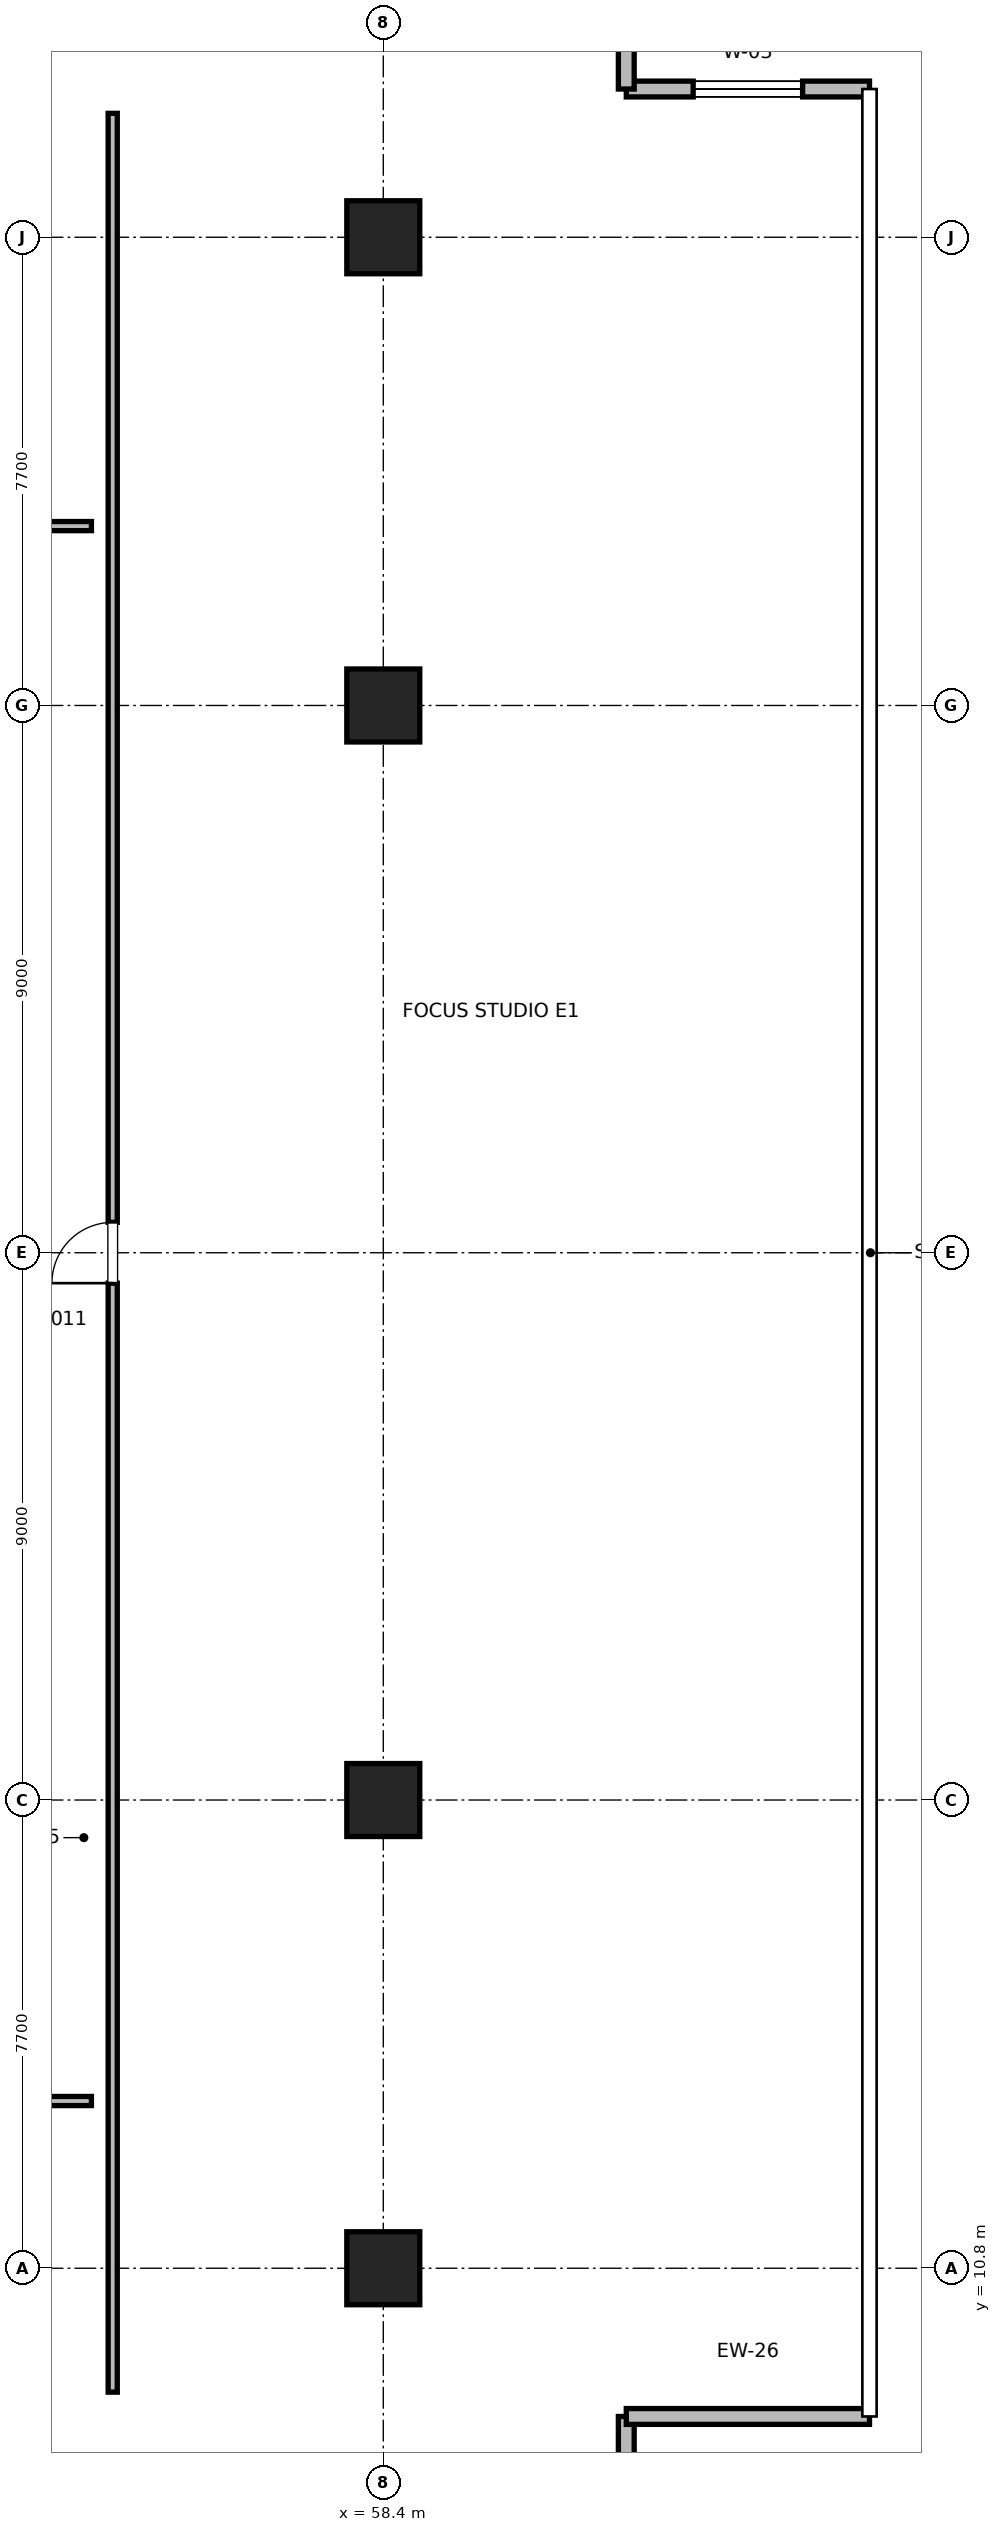
"""IFC4 building model, lengths in metres.
Left out: names, types, materials, properties, quantities, classifications, styles, units other than length and angle.
Written with IfcOpenShell. Run it as: python <this file> out.ifc"""

import sys

from ifc_helpers import new_model, si_unit, direction, frame, frame_2d, origin, origin_2d, place, context, subcontext, project, spatial, rectangle, extrude, element, fill, save


model = new_model("IFC4")
c1 = context("Model", 3, precision=1e-05, world=origin(), true_north=direction((0.0, 1.0)))
c2 = subcontext(c1, "Body", "Model", "MODEL_VIEW")
j1 = project(units=[si_unit("LENGTHUNIT", "METRE"), si_unit("PLANEANGLEUNIT", "RADIAN")], contexts=[c1])
p1 = place(None, origin())
s1 = spatial("IfcSite", under=j1, at=p1, CompositionType="ELEMENT")
p2 = place(p1, origin())
s2 = spatial("IfcBuilding", under=s1, at=p2, CompositionType="ELEMENT")
p3 = place(p2, frame((0.0, 0.0, 251.2)))
s3 = spatial("IfcBuildingStorey", under=s2, at=p3, CompositionType="ELEMENT", Elevation=251.2)
for number, where, z_axis, x_axis in (
    (1, (58.4, 18.5, 0.0), (0.0, 0.0, 1.0), (1.0, 0.0, 0.0)),
    (2, (58.4, 36.5, 0.0), (0.0, 0.0, 1.0), (1.0, 0.0, 0.0)),
    (3, (58.4, 10.8, 0.0), (0.0, 0.0, 1.0), (1.0, 0.0, 0.0)),
    (4, (58.4, 44.2, 0.0), (0.0, 0.0, 1.0), (1.0, 0.0, 0.0)),
):
    element("IfcColumn", number, at=place(p3, frame(where, z_axis=z_axis, x_axis=x_axis)), inside=s3, PredefinedType="COLUMN", context=c2, shape_type="SweptSolid", body=[
        extrude(rectangle(XDim=1.2, YDim=1.2, at=origin_2d()), origin(), (0.0, 0.0, 1.0), 4.0),
    ])
p4 = place(p3, frame((62.396, 4.862, 0.0), z_axis=(0.0, 0.0, 1.0), x_axis=(0.0, 1.0, 0.0)))
e5 = element("IfcWall", 5, at=p4, inside=s3, PredefinedType="PARAPET", context=c2, shape_type="SweptSolid", body=[
    extrude(rectangle(XDim=3.5, YDim=0.26, at=frame_2d((1.75, 0.0))), origin(), (0.0, 0.0, 1.0), 3.785),
])
p5 = place(p4, frame((0.85, 0.0, 0.85)))
e6 = element("IfcOpeningElement", 6, at=p5, cuts=e5, PredefinedType="OPENING", context=c2, shape_type="SweptSolid", body=[
    extrude(rectangle(XDim=1.8, YDim=2.2, at=frame_2d((0.9, 1.1))), frame((0.0, 0.13, 0.0), z_axis=(0.0, -1.0, 0.0), x_axis=(1.0, 0.0, 0.0)), (0.0, 0.0, 1.0), 0.26),
])
p6 = place(p3, frame((62.396, 8.362, 0.0), z_axis=(0.0, 0.0, 1.0), x_axis=(1.0, 0.0, 0.0)))
e7 = element("IfcWall", 7, at=p6, inside=s3, PredefinedType="PARAPET", context=c2, shape_type="SweptSolid", body=[
    extrude(rectangle(XDim=4.0, YDim=0.26, at=frame_2d((2.0, 0.0))), origin(), (0.0, 0.0, 1.0), 3.785),
])
p7 = place(p3, frame((66.396, 46.638, 0.0), z_axis=(0.0, 0.0, 1.0), x_axis=(-1.0, 0.0, 0.0)))
e8 = element("IfcWall", 8, at=p7, inside=s3, PredefinedType="PARAPET", context=c2, shape_type="SweptSolid", body=[
    extrude(rectangle(XDim=4.0, YDim=0.26, at=frame_2d((2.0, 0.0))), origin(), (0.0, 0.0, 1.0), 3.785),
])
p8 = place(p7, frame((1.1, 0.0, 0.85)))
e9 = element("IfcOpeningElement", 9, at=p8, cuts=e8, PredefinedType="OPENING", context=c2, shape_type="SweptSolid", body=[
    extrude(rectangle(XDim=1.8, YDim=2.2, at=frame_2d((0.9, 1.1))), frame((0.0, 0.13, 0.0), z_axis=(0.0, -1.0, 0.0), x_axis=(1.0, 0.0, 0.0)), (0.0, 0.0, 1.0), 0.26),
])
p9 = place(p3, frame((62.396, 46.638, 0.0), z_axis=(0.0, 0.0, 1.0), x_axis=(0.0, 1.0, 0.0)))
e10 = element("IfcWall", 10, at=p9, inside=s3, PredefinedType="PARAPET", context=c2, shape_type="SweptSolid", body=[
    extrude(rectangle(XDim=3.5, YDim=0.26, at=frame_2d((1.75, 0.0))), origin(), (0.0, 0.0, 1.0), 3.785),
])
p10 = place(p3, frame((44.422, 39.45, 0.0), z_axis=(0.0, 0.0, 1.0), x_axis=(1.0, 0.0, 0.0)))
e11 = element("IfcWall", 11, at=p10, inside=s3, PredefinedType="PARTITIONING", context=c2, shape_type="SweptSolid", body=[
    extrude(rectangle(XDim=9.178, YDim=0.15, at=frame_2d((4.589, 0.0))), origin(), (0.0, 0.0, 1.0), 2.85),
])
p11 = place(p10, frame((4.039, 0.0, 0.0)))
e12 = element("IfcOpeningElement", 12, at=p11, cuts=e11, PredefinedType="OPENING", context=c2, shape_type="SweptSolid", body=[
    extrude(rectangle(XDim=1.0, YDim=2.15, at=frame_2d((0.5, 1.075))), frame((0.0, 0.075, 0.0), z_axis=(0.0, -1.0, 0.0), x_axis=(1.0, 0.0, 0.0)), (0.0, 0.0, 1.0), 0.15),
])
p12 = place(p3, frame((38.71, 13.55, 0.0), z_axis=(0.0, 0.0, 1.0), x_axis=(1.0, 0.0, 0.0)))
e13 = element("IfcWall", 13, at=p12, inside=s3, PredefinedType="PARTITIONING", context=c2, shape_type="SweptSolid", body=[
    extrude(rectangle(XDim=14.89, YDim=0.15, at=frame_2d((7.445, 0.0))), origin(), (0.0, 0.0, 1.0), 2.85),
])
p13 = place(p12, frame((6.895, 0.0, 0.0)))
e14 = element("IfcOpeningElement", 14, at=p13, cuts=e13, PredefinedType="OPENING", context=c2, shape_type="SweptSolid", body=[
    extrude(rectangle(XDim=1.0, YDim=2.15, at=frame_2d((0.5, 1.075))), frame((0.0, 0.075, 0.0), z_axis=(0.0, -1.0, 0.0), x_axis=(1.0, 0.0, 0.0)), (0.0, 0.0, 1.0), 0.15),
])
p14 = place(p3, frame((53.95, 8.762, 0.0), z_axis=(0.0, 0.0, 1.0), x_axis=(0.0, 1.0, 0.0)))
e15 = element("IfcWall", 15, at=p14, inside=s3, PredefinedType="PARTITIONING", context=c2, shape_type="SweptSolid", body=[
    extrude(rectangle(XDim=37.475, YDim=0.15, at=frame_2d((18.738, 0.0))), origin(), (0.0, 0.0, 1.0), 2.85),
])
p15 = place(p14, frame((18.238, 0.0, 0.0)))
e16 = element("IfcOpeningElement", 16, at=p15, cuts=e15, PredefinedType="OPENING", context=c2, shape_type="SweptSolid", body=[
    extrude(rectangle(XDim=1.0, YDim=2.15, at=frame_2d((0.5, 1.075))), frame((0.0, 0.075, 0.0), z_axis=(0.0, -1.0, 0.0), x_axis=(1.0, 0.0, 0.0)), (0.0, 0.0, 1.0), 0.15),
])
p16 = place(p8, origin())
e17 = element("IfcWindow", 17, at=p16, inside=s3, PartitioningType="SINGLE_PANEL", PredefinedType="WINDOW", context=c2, shape_type="SweptSolid", body=[
    extrude(rectangle(XDim=1.8, YDim=2.2, at=frame_2d((0.9, 1.1))), frame((0.0, 0.03, 0.0), z_axis=(0.0, -1.0, 0.0), x_axis=(1.0, 0.0, 0.0)), (0.0, 0.0, 1.0), 0.06),
])
fill(e9, e17)
p17 = place(p15, origin())
e18 = element("IfcDoor", 18, at=p17, inside=s3, OperationType="SINGLE_SWING_LEFT", PredefinedType="DOOR", context=c2, shape_type="SweptSolid", body=[
    extrude(rectangle(XDim=1.0, YDim=2.15, at=frame_2d((0.5, 1.075))), frame((0.0, 0.025, 0.0), z_axis=(0.0, -1.0, 0.0), x_axis=(1.0, 0.0, 0.0)), (0.0, 0.0, 1.0), 0.05),
])
fill(e16, e18)
save(model, sys.argv[1])
